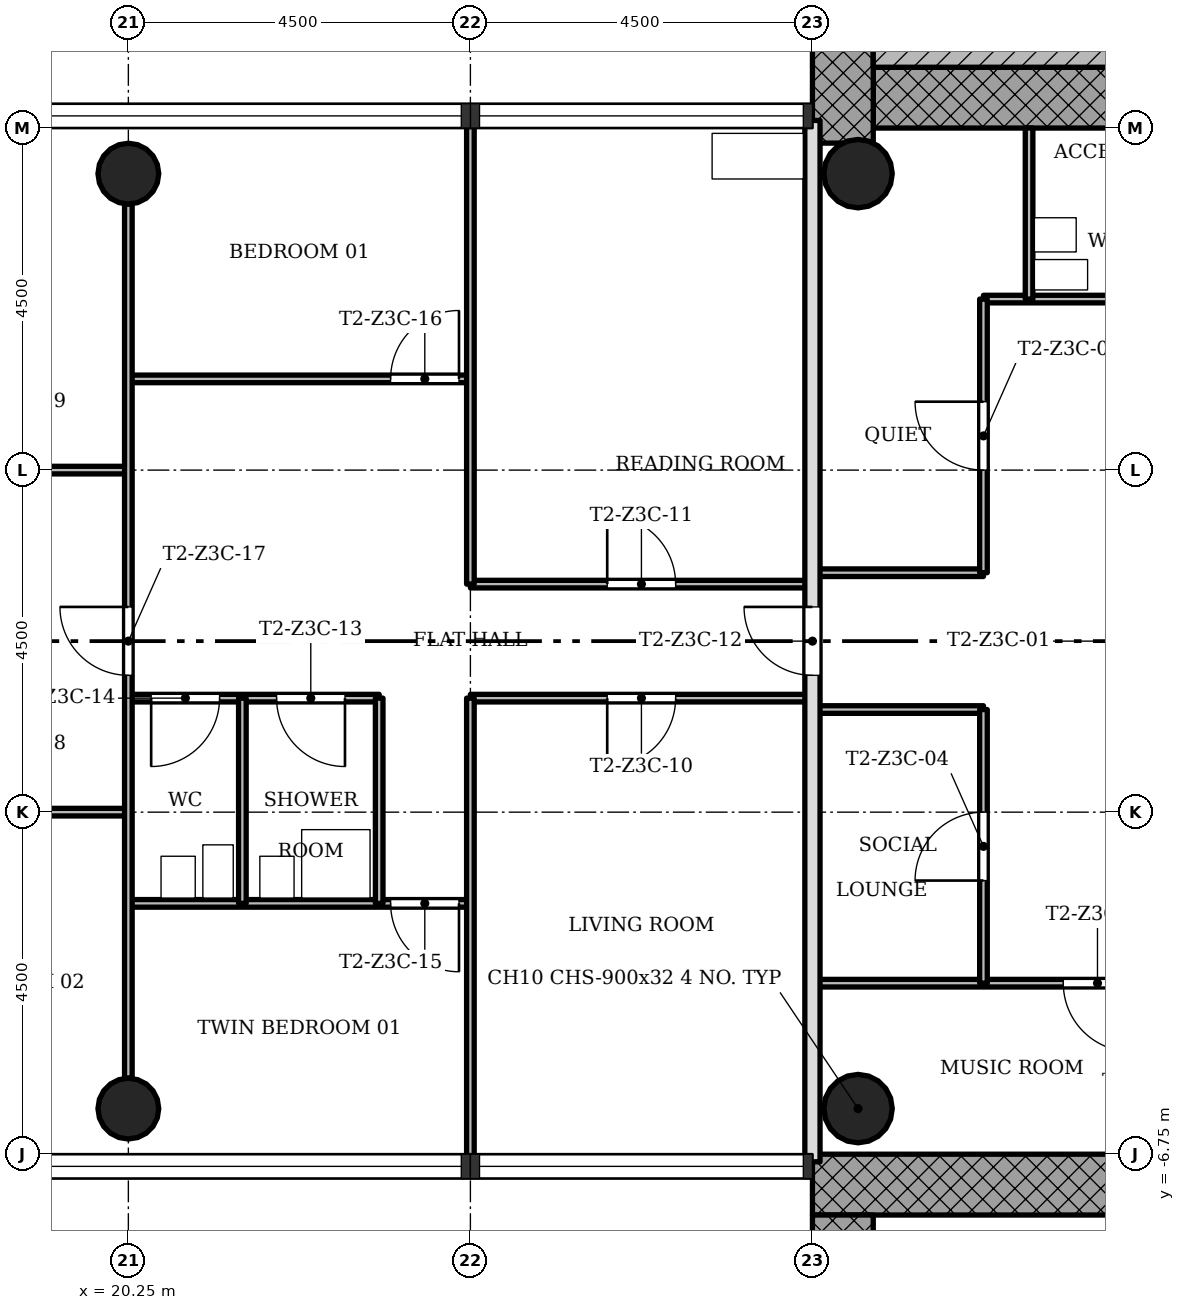
"""IFC4 building model, lengths in metres.
Left out: names, types, materials, properties, quantities, classifications, styles, units other than length and angle.
Written with IfcOpenShell. Run it as: python <this file> out.ifc"""

import sys

from ifc_helpers import new_model, si_unit, direction, frame, frame_2d, origin, origin_2d, place, context, subcontext, project, spatial, rectangle, hollow_circle, extrude, element, fill, save


model = new_model("IFC4")
c1 = context("Model", 3, precision=1e-05, world=origin(), true_north=direction((0.0, 1.0)))
c2 = subcontext(c1, "Body", "Model", "MODEL_VIEW")
j1 = project(units=[si_unit("LENGTHUNIT", "METRE"), si_unit("PLANEANGLEUNIT", "RADIAN")], contexts=[c1])
p1 = place(None, origin())
s1 = spatial("IfcSite", under=j1, at=p1, CompositionType="ELEMENT")
p2 = place(p1, origin())
s2 = spatial("IfcBuilding", under=s1, at=p2, CompositionType="ELEMENT")
p3 = place(p2, frame((0.0, 0.0, 154.1)))
s3 = spatial("IfcBuildingStorey", under=s2, at=p3, CompositionType="ELEMENT", Elevation=154.1)
p4 = place(p3, frame((30.05, 7.15, 0.0), z_axis=(0.0, 0.0, 1.0), x_axis=(1.0, 0.0, 0.0)))
e1 = element("IfcWall", 1, at=p4, inside=s3, PredefinedType="SHEAR", context=c2, shape_type="SweptSolid", body=[
    extrude(rectangle(XDim=12.7, YDim=0.8, at=frame_2d((6.35, 0.0))), origin(), (0.0, 0.0, 1.0), 3.4),
])
p5 = place(p4, frame((5.05, 0.0, 0.0)))
e2 = element("IfcOpeningElement", 2, at=p5, cuts=e1, PredefinedType="OPENING", context=c2, shape_type="SweptSolid", body=[
    extrude(rectangle(XDim=1.8, YDim=2.1, at=frame_2d((0.9, 1.05))), frame((0.0, 0.41, 0.0), z_axis=(0.0, -1.0, 0.0), x_axis=(1.0, 0.0, 0.0)), (0.0, 0.0, 1.0), 0.82),
])
p6 = place(p3, frame((29.65, 15.348, 0.0), z_axis=(0.0, 0.0, 1.0), x_axis=(0.0, -1.0, 0.0)))
e3 = element("IfcWall", 3, at=p6, inside=s3, PredefinedType="SHEAR", context=c2, shape_type="SweptSolid", body=[
    extrude(rectangle(XDim=8.796, YDim=0.8, at=frame_2d((4.398, 0.0))), origin(), (0.0, 0.0, 1.0), 3.4),
])
p7 = place(p3, frame((41.95, -7.15, 0.0), z_axis=(0.0, 0.0, 1.0), x_axis=(-1.0, 0.0, 0.0)))
e4 = element("IfcWall", 4, at=p7, inside=s3, PredefinedType="SHEAR", context=c2, shape_type="SweptSolid", body=[
    extrude(rectangle(XDim=12.7, YDim=0.8, at=frame_2d((6.35, 0.0))), origin(), (0.0, 0.0, 1.0), 3.4),
])
p8 = place(p7, frame((5.05, 0.0, 0.0)))
e5 = element("IfcOpeningElement", 5, at=p8, cuts=e4, PredefinedType="OPENING", context=c2, shape_type="SweptSolid", body=[
    extrude(rectangle(XDim=1.8, YDim=2.1, at=frame_2d((0.9, 1.05))), frame((0.0, 0.41, 0.0), z_axis=(0.0, -1.0, 0.0), x_axis=(1.0, 0.0, 0.0)), (0.0, 0.0, 1.0), 0.82),
])
p9 = place(p3, frame((29.65, -7.55, 0.0), z_axis=(0.0, 0.0, 1.0), x_axis=(0.0, -1.0, 0.0)))
e6 = element("IfcWall", 6, at=p9, inside=s3, PredefinedType="SHEAR", context=c2, shape_type="SweptSolid", body=[
    extrude(rectangle(XDim=8.2, YDim=0.8, at=frame_2d((4.1, 0.0))), origin(), (0.0, 0.0, 1.0), 3.4),
])
for number, where, z_axis, x_axis in (
    (7, (20.25, 6.15, 0.0), (0.0, 0.0, 1.0), (1.0, 0.0, 0.0)),
    (8, (20.25, -6.15, 0.0), (0.0, 0.0, 1.0), (1.0, 0.0, 0.0)),
):
    element("IfcColumn", number, at=place(p3, frame(where, z_axis=z_axis, x_axis=x_axis)), inside=s3, PredefinedType="COLUMN", context=c2, shape_type="SweptSolid", body=[
        extrude(hollow_circle(Radius=0.4, WallThickness=0.028, at=origin_2d()), origin(), (0.0, 0.0, 1.0), 3.4),
    ])
for number, where, z_axis, x_axis in (
    (9, (29.85, 6.15, 0.0), (0.0, 0.0, 1.0), (1.0, 0.0, 0.0)),
    (10, (29.85, -6.15, 0.0), (0.0, 0.0, 1.0), (1.0, 0.0, 0.0)),
):
    element("IfcColumn", number, at=place(p3, frame(where, z_axis=z_axis, x_axis=x_axis)), inside=s3, PredefinedType="COLUMN", context=c2, shape_type="SweptSolid", body=[
        extrude(hollow_circle(Radius=0.45, WallThickness=0.032, at=origin_2d()), origin(), (0.0, 0.0, 1.0), 3.4),
    ])
p10 = place(p3, frame((34.5, -4.5, 0.0), z_axis=(0.0, 0.0, 1.0), x_axis=(-1.0, 0.0, 0.0)))
e11 = element("IfcWall", 11, at=p10, inside=s3, PredefinedType="PARTITIONING", context=c2, shape_type="SweptSolid", body=[
    extrude(rectangle(XDim=5.25, YDim=0.1, at=frame_2d((2.625, 0.0))), origin(), (0.0, 0.0, 1.0), 3.0),
])
p11 = place(p10, frame((1.05, 0.0, 0.0)))
e12 = element("IfcOpeningElement", 12, at=p11, cuts=e11, PredefinedType="OPENING", context=c2, shape_type="SweptSolid", body=[
    extrude(rectangle(XDim=0.9, YDim=2.1, at=frame_2d((0.45, 1.05))), frame((0.0, 0.06, 0.0), z_axis=(0.0, -1.0, 0.0), x_axis=(1.0, 0.0, 0.0)), (0.0, 0.0, 1.0), 0.12),
])
p12 = place(p3, frame((24.75, -3.45, 0.0), z_axis=(0.0, 0.0, 1.0), x_axis=(-1.0, 0.0, 0.0)))
e13 = element("IfcWall", 13, at=p12, inside=s3, PredefinedType="PARTITIONING", context=c2, shape_type="SweptSolid", body=[
    extrude(rectangle(XDim=4.5, YDim=0.1, at=frame_2d((2.25, 0.0))), origin(), (0.0, 0.0, 1.0), 3.0),
])
p13 = place(p12, frame((0.15, 0.0, 0.0)))
e14 = element("IfcOpeningElement", 14, at=p13, cuts=e13, PredefinedType="OPENING", context=c2, shape_type="SweptSolid", body=[
    extrude(rectangle(XDim=0.9, YDim=2.1, at=frame_2d((0.45, 1.05))), frame((0.0, 0.06, 0.0), z_axis=(0.0, -1.0, 0.0), x_axis=(1.0, 0.0, 0.0)), (0.0, 0.0, 1.0), 0.12),
])
p14 = place(p3, frame((20.25, -2.25, 0.0), z_axis=(0.0, 0.0, 1.0), x_axis=(-1.0, 0.0, 0.0)))
e15 = element("IfcWall", 15, at=p14, inside=s3, PredefinedType="PARTITIONING", context=c2, shape_type="SweptSolid", body=[
    extrude(rectangle(XDim=4.6, YDim=0.1, at=frame_2d((2.3, 0.0))), origin(), (0.0, 0.0, 1.0), 3.0),
])
p15 = place(p14, frame((1.05, 0.0, 0.0)))
e16 = element("IfcOpeningElement", 16, at=p15, cuts=e15, PredefinedType="OPENING", context=c2, shape_type="SweptSolid", body=[
    extrude(rectangle(XDim=0.9, YDim=2.1, at=frame_2d((0.45, 1.05))), frame((0.0, 0.06, 0.0), z_axis=(0.0, -1.0, 0.0), x_axis=(1.0, 0.0, 0.0)), (0.0, 0.0, 1.0), 0.12),
])
p16 = place(p3, frame((31.5, -0.9, 0.0), z_axis=(0.0, 0.0, 1.0), x_axis=(-1.0, 0.0, 0.0)))
e17 = element("IfcWall", 17, at=p16, inside=s3, PredefinedType="PARTITIONING", context=c2, shape_type="SweptSolid", body=[
    extrude(rectangle(XDim=2.25, YDim=0.1, at=frame_2d((1.125, 0.0))), origin(), (0.0, 0.0, 1.0), 3.0),
])
p17 = place(p3, frame((29.25, -0.75, 0.0), z_axis=(0.0, 0.0, 1.0), x_axis=(-1.0, 0.0, 0.0)))
e18 = element("IfcWall", 18, at=p17, inside=s3, PredefinedType="PARTITIONING", context=c2, shape_type="SweptSolid", body=[
    extrude(rectangle(XDim=4.5, YDim=0.1, at=frame_2d((2.25, 0.0))), origin(), (0.0, 0.0, 1.0), 3.0),
])
p18 = place(p17, frame((1.8, 0.0, 0.0)))
e19 = element("IfcOpeningElement", 19, at=p18, cuts=e18, PredefinedType="OPENING", context=c2, shape_type="SweptSolid", body=[
    extrude(rectangle(XDim=0.9, YDim=2.1, at=frame_2d((0.45, 1.05))), frame((0.0, 0.06, 0.0), z_axis=(0.0, -1.0, 0.0), x_axis=(1.0, 0.0, 0.0)), (0.0, 0.0, 1.0), 0.12),
])
p19 = place(p3, frame((23.55, -0.75, 0.0), z_axis=(0.0, 0.0, 1.0), x_axis=(-1.0, 0.0, 0.0)))
e20 = element("IfcWall", 20, at=p19, inside=s3, PredefinedType="PARTITIONING", context=c2, shape_type="SweptSolid", body=[
    extrude(rectangle(XDim=3.3, YDim=0.1, at=frame_2d((1.65, 0.0))), origin(), (0.0, 0.0, 1.0), 3.0),
])
p20 = place(p19, frame((0.45, 0.0, 0.0)))
e21 = element("IfcOpeningElement", 21, at=p20, cuts=e20, PredefinedType="OPENING", context=c2, shape_type="SweptSolid", body=[
    extrude(rectangle(XDim=0.9, YDim=2.1, at=frame_2d((0.45, 1.05))), frame((0.0, 0.06, 0.0), z_axis=(0.0, -1.0, 0.0), x_axis=(1.0, 0.0, 0.0)), (0.0, 0.0, 1.0), 0.12),
])
p21 = place(p19, frame((2.1, 0.0, 0.0)))
e22 = element("IfcOpeningElement", 22, at=p21, cuts=e20, PredefinedType="OPENING", context=c2, shape_type="SweptSolid", body=[
    extrude(rectangle(XDim=0.9, YDim=2.1, at=frame_2d((0.45, 1.05))), frame((0.0, 0.06, 0.0), z_axis=(0.0, -1.0, 0.0), x_axis=(1.0, 0.0, 0.0)), (0.0, 0.0, 1.0), 0.12),
])
p22 = place(p3, frame((29.25, 0.75, 0.0), z_axis=(0.0, 0.0, 1.0), x_axis=(-1.0, 0.0, 0.0)))
e23 = element("IfcWall", 23, at=p22, inside=s3, PredefinedType="PARTITIONING", context=c2, shape_type="SweptSolid", body=[
    extrude(rectangle(XDim=4.5, YDim=0.1, at=frame_2d((2.25, 0.0))), origin(), (0.0, 0.0, 1.0), 3.0),
])
p23 = place(p22, frame((1.8, 0.0, 0.0)))
e24 = element("IfcOpeningElement", 24, at=p23, cuts=e23, PredefinedType="OPENING", context=c2, shape_type="SweptSolid", body=[
    extrude(rectangle(XDim=0.9, YDim=2.1, at=frame_2d((0.45, 1.05))), frame((0.0, 0.06, 0.0), z_axis=(0.0, -1.0, 0.0), x_axis=(1.0, 0.0, 0.0)), (0.0, 0.0, 1.0), 0.12),
])
p24 = place(p3, frame((31.5, 0.9, 0.0), z_axis=(0.0, 0.0, 1.0), x_axis=(-1.0, 0.0, 0.0)))
e25 = element("IfcWall", 25, at=p24, inside=s3, PredefinedType="PARTITIONING", context=c2, shape_type="SweptSolid", body=[
    extrude(rectangle(XDim=2.25, YDim=0.1, at=frame_2d((1.125, 0.0))), origin(), (0.0, 0.0, 1.0), 3.0),
])
p25 = place(p3, frame((20.25, 2.25, 0.0), z_axis=(0.0, 0.0, 1.0), x_axis=(-1.0, 0.0, 0.0)))
e26 = element("IfcWall", 26, at=p25, inside=s3, PredefinedType="PARTITIONING", context=c2, shape_type="SweptSolid", body=[
    extrude(rectangle(XDim=4.6, YDim=0.1, at=frame_2d((2.3, 0.0))), origin(), (0.0, 0.0, 1.0), 3.0),
])
p26 = place(p25, frame((1.05, 0.0, 0.0)))
e27 = element("IfcOpeningElement", 27, at=p26, cuts=e26, PredefinedType="OPENING", context=c2, shape_type="SweptSolid", body=[
    extrude(rectangle(XDim=0.9, YDim=2.1, at=frame_2d((0.45, 1.05))), frame((0.0, 0.06, 0.0), z_axis=(0.0, -1.0, 0.0), x_axis=(1.0, 0.0, 0.0)), (0.0, 0.0, 1.0), 0.12),
])
p27 = place(p3, frame((24.75, 3.45, 0.0), z_axis=(0.0, 0.0, 1.0), x_axis=(-1.0, 0.0, 0.0)))
e28 = element("IfcWall", 28, at=p27, inside=s3, PredefinedType="PARTITIONING", context=c2, shape_type="SweptSolid", body=[
    extrude(rectangle(XDim=4.5, YDim=0.1, at=frame_2d((2.25, 0.0))), origin(), (0.0, 0.0, 1.0), 3.0),
])
p28 = place(p27, frame((0.15, 0.0, 0.0)))
e29 = element("IfcOpeningElement", 29, at=p28, cuts=e28, PredefinedType="OPENING", context=c2, shape_type="SweptSolid", body=[
    extrude(rectangle(XDim=0.9, YDim=2.1, at=frame_2d((0.45, 1.05))), frame((0.0, 0.06, 0.0), z_axis=(0.0, -1.0, 0.0), x_axis=(1.0, 0.0, 0.0)), (0.0, 0.0, 1.0), 0.12),
])
p29 = place(p3, frame((34.5, 4.5, 0.0), z_axis=(0.0, 0.0, 1.0), x_axis=(-1.0, 0.0, 0.0)))
e30 = element("IfcWall", 30, at=p29, inside=s3, PredefinedType="PARTITIONING", context=c2, shape_type="SweptSolid", body=[
    extrude(rectangle(XDim=3.0, YDim=0.1, at=frame_2d((1.5, 0.0))), origin(), (0.0, 0.0, 1.0), 3.0),
])
p30 = place(p3, frame((32.1, 4.5, 0.0), z_axis=(0.0, 0.0, 1.0), x_axis=(0.0, 1.0, 0.0)))
e31 = element("IfcWall", 31, at=p30, inside=s3, PredefinedType="PARTITIONING", context=c2, shape_type="SweptSolid", body=[
    extrude(rectangle(XDim=2.25, YDim=0.1, at=frame_2d((1.125, 0.0))), origin(), (0.0, 0.0, 1.0), 3.0),
])
p31 = place(p3, frame((31.5, -4.5, 0.0), z_axis=(0.0, 0.0, 1.0), x_axis=(0.0, 1.0, 0.0)))
e32 = element("IfcWall", 32, at=p31, inside=s3, PredefinedType="PARTITIONING", context=c2, shape_type="SweptSolid", body=[
    extrude(rectangle(XDim=3.6, YDim=0.1, at=frame_2d((1.8, 0.0))), origin(), (0.0, 0.0, 1.0), 3.0),
])
p32 = place(p31, frame((1.35, 0.0, 0.0)))
e33 = element("IfcOpeningElement", 33, at=p32, cuts=e32, PredefinedType="OPENING", context=c2, shape_type="SweptSolid", body=[
    extrude(rectangle(XDim=0.9, YDim=2.1, at=frame_2d((0.45, 1.05))), frame((0.0, 0.06, 0.0), z_axis=(0.0, -1.0, 0.0), x_axis=(1.0, 0.0, 0.0)), (0.0, 0.0, 1.0), 0.12),
])
p33 = place(p3, frame((31.5, 0.9, 0.0), z_axis=(0.0, 0.0, 1.0), x_axis=(0.0, 1.0, 0.0)))
e34 = element("IfcWall", 34, at=p33, inside=s3, PredefinedType="PARTITIONING", context=c2, shape_type="SweptSolid", body=[
    extrude(rectangle(XDim=3.6, YDim=0.1, at=frame_2d((1.8, 0.0))), origin(), (0.0, 0.0, 1.0), 3.0),
])
p34 = place(p33, frame((1.35, 0.0, 0.0)))
e35 = element("IfcOpeningElement", 35, at=p34, cuts=e34, PredefinedType="OPENING", context=c2, shape_type="SweptSolid", body=[
    extrude(rectangle(XDim=0.9, YDim=2.1, at=frame_2d((0.45, 1.05))), frame((0.0, 0.06, 0.0), z_axis=(0.0, -1.0, 0.0), x_axis=(1.0, 0.0, 0.0)), (0.0, 0.0, 1.0), 0.12),
])
p35 = place(p3, frame((29.25, -6.85, 0.0), z_axis=(0.0, 0.0, 1.0), x_axis=(0.0, 1.0, 0.0)))
e36 = element("IfcWall", 36, at=p35, inside=s3, PredefinedType="SOLIDWALL", context=c2, shape_type="SweptSolid", body=[
    extrude(rectangle(XDim=13.7, YDim=0.2, at=frame_2d((6.85, 0.0))), origin(), (0.0, 0.0, 1.0), 3.0),
])
p36 = place(p35, frame((6.4, 0.0, 0.0)))
e37 = element("IfcOpeningElement", 37, at=p36, cuts=e36, PredefinedType="OPENING", context=c2, shape_type="SweptSolid", body=[
    extrude(rectangle(XDim=0.9, YDim=2.1, at=frame_2d((0.45, 1.05))), frame((0.0, 0.11, 0.0), z_axis=(0.0, -1.0, 0.0), x_axis=(1.0, 0.0, 0.0)), (0.0, 0.0, 1.0), 0.22),
])
for number, where, z_axis, x_axis in (
    (38, (24.75, -6.85, 0.0), (0.0, 0.0, 1.0), (0.0, 1.0, 0.0)),
    (39, (24.75, 0.75, 0.0), (0.0, 0.0, 1.0), (0.0, 1.0, 0.0)),
):
    element("IfcWall", number, at=place(p3, frame(where, z_axis=z_axis, x_axis=x_axis)), inside=s3, PredefinedType="PARTITIONING", context=c2, shape_type="SweptSolid", body=[
        extrude(rectangle(XDim=6.1, YDim=0.1, at=frame_2d((3.05, 0.0))), origin(), (0.0, 0.0, 1.0), 3.0),
    ])
for number, where, z_axis, x_axis in (
    (40, (23.55, -3.45, 0.0), (0.0, 0.0, 1.0), (0.0, 1.0, 0.0)),
    (41, (21.75, -3.45, 0.0), (0.0, 0.0, 1.0), (0.0, 1.0, 0.0)),
):
    element("IfcWall", number, at=place(p3, frame(where, z_axis=z_axis, x_axis=x_axis)), inside=s3, PredefinedType="PARTITIONING", context=c2, shape_type="SweptSolid", body=[
        extrude(rectangle(XDim=2.7, YDim=0.1, at=frame_2d((1.35, 0.0))), origin(), (0.0, 0.0, 1.0), 3.0),
    ])
p37 = place(p3, frame((20.25, -5.75, 0.0), z_axis=(0.0, 0.0, 1.0), x_axis=(0.0, 1.0, 0.0)))
e42 = element("IfcWall", 42, at=p37, inside=s3, PredefinedType="PARTITIONING", context=c2, shape_type="SweptSolid", body=[
    extrude(rectangle(XDim=11.5, YDim=0.1, at=frame_2d((5.75, 0.0))), origin(), (0.0, 0.0, 1.0), 3.0),
])
p38 = place(p37, frame((5.3, 0.0, 0.0)))
e43 = element("IfcOpeningElement", 43, at=p38, cuts=e42, PredefinedType="OPENING", context=c2, shape_type="SweptSolid", body=[
    extrude(rectangle(XDim=0.9, YDim=2.1, at=frame_2d((0.45, 1.05))), frame((0.0, 0.06, 0.0), z_axis=(0.0, -1.0, 0.0), x_axis=(1.0, 0.0, 0.0)), (0.0, 0.0, 1.0), 0.12),
])
p39 = place(p3, frame((34.15, 7.75, 0.0), z_axis=(0.0, 0.0, 1.0), x_axis=(-1.0, 0.0, 0.0)))
e44 = element("IfcWall", 44, at=p39, inside=s3, PredefinedType="SHEAR", context=c2, shape_type="SweptSolid", body=[
    extrude(rectangle(XDim=4.1, YDim=0.4, at=frame_2d((2.05, 0.0))), origin(), (0.0, 0.0, 1.0), 3.4),
])
p40 = place(p34, origin())
e45 = element("IfcDoor", 45, at=p40, inside=s3, OperationType="SINGLE_SWING_LEFT", PredefinedType="DOOR", context=c2, shape_type="SweptSolid", body=[
    extrude(rectangle(XDim=0.9, YDim=2.1, at=frame_2d((0.45, 1.05))), frame((0.0, 0.025, 0.0), z_axis=(0.0, -1.0, 0.0), x_axis=(1.0, 0.0, 0.0)), (0.0, 0.0, 1.0), 0.05),
])
fill(e35, e45)
p41 = place(p32, origin())
e46 = element("IfcDoor", 46, at=p41, inside=s3, OperationType="SINGLE_SWING_RIGHT", PredefinedType="DOOR", context=c2, shape_type="SweptSolid", body=[
    extrude(rectangle(XDim=0.9, YDim=2.1, at=frame_2d((0.45, 1.05))), frame((0.0, 0.025, 0.0), z_axis=(0.0, -1.0, 0.0), x_axis=(1.0, 0.0, 0.0)), (0.0, 0.0, 1.0), 0.05),
])
fill(e33, e46)
p42 = place(p11, origin())
e47 = element("IfcDoor", 47, at=p42, inside=s3, OperationType="SINGLE_SWING_RIGHT", PredefinedType="DOOR", context=c2, shape_type="SweptSolid", body=[
    extrude(rectangle(XDim=0.9, YDim=2.1, at=frame_2d((0.45, 1.05))), frame((0.0, 0.025, 0.0), z_axis=(0.0, -1.0, 0.0), x_axis=(1.0, 0.0, 0.0)), (0.0, 0.0, 1.0), 0.05),
])
fill(e12, e47)
p43 = place(p18, origin())
e48 = element("IfcDoor", 48, at=p43, inside=s3, OperationType="SINGLE_SWING_LEFT", PredefinedType="DOOR", context=c2, shape_type="SweptSolid", body=[
    extrude(rectangle(XDim=0.9, YDim=2.1, at=frame_2d((0.45, 1.05))), frame((0.0, 0.025, 0.0), z_axis=(0.0, -1.0, 0.0), x_axis=(1.0, 0.0, 0.0)), (0.0, 0.0, 1.0), 0.05),
])
fill(e19, e48)
p44 = place(p23, origin())
e49 = element("IfcDoor", 49, at=p44, inside=s3, OperationType="SINGLE_SWING_RIGHT", PredefinedType="DOOR", context=c2, shape_type="SweptSolid", body=[
    extrude(rectangle(XDim=0.9, YDim=2.1, at=frame_2d((0.45, 1.05))), frame((0.0, 0.025, 0.0), z_axis=(0.0, -1.0, 0.0), x_axis=(1.0, 0.0, 0.0)), (0.0, 0.0, 1.0), 0.05),
])
fill(e24, e49)
p45 = place(p36, origin())
e50 = element("IfcDoor", 50, at=p45, inside=s3, OperationType="SINGLE_SWING_LEFT", PredefinedType="DOOR", context=c2, shape_type="SweptSolid", body=[
    extrude(rectangle(XDim=0.9, YDim=2.1, at=frame_2d((0.45, 1.05))), frame((0.0, 0.025, 0.0), z_axis=(0.0, -1.0, 0.0), x_axis=(1.0, 0.0, 0.0)), (0.0, 0.0, 1.0), 0.05),
])
fill(e37, e50)
p46 = place(p20, origin())
e51 = element("IfcDoor", 51, at=p46, inside=s3, OperationType="SINGLE_SWING_RIGHT", PredefinedType="DOOR", context=c2, shape_type="SweptSolid", body=[
    extrude(rectangle(XDim=0.9, YDim=2.1, at=frame_2d((0.45, 1.05))), frame((0.0, 0.025, 0.0), z_axis=(0.0, -1.0, 0.0), x_axis=(1.0, 0.0, 0.0)), (0.0, 0.0, 1.0), 0.05),
])
fill(e21, e51)
p47 = place(p21, origin())
e52 = element("IfcDoor", 52, at=p47, inside=s3, OperationType="SINGLE_SWING_LEFT", PredefinedType="DOOR", context=c2, shape_type="SweptSolid", body=[
    extrude(rectangle(XDim=0.9, YDim=2.1, at=frame_2d((0.45, 1.05))), frame((0.0, 0.025, 0.0), z_axis=(0.0, -1.0, 0.0), x_axis=(1.0, 0.0, 0.0)), (0.0, 0.0, 1.0), 0.05),
])
fill(e22, e52)
p48 = place(p13, origin())
e53 = element("IfcDoor", 53, at=p48, inside=s3, OperationType="SINGLE_SWING_RIGHT", PredefinedType="DOOR", context=c2, shape_type="SweptSolid", body=[
    extrude(rectangle(XDim=0.9, YDim=2.1, at=frame_2d((0.45, 1.05))), frame((0.0, 0.025, 0.0), z_axis=(0.0, -1.0, 0.0), x_axis=(1.0, 0.0, 0.0)), (0.0, 0.0, 1.0), 0.05),
])
fill(e14, e53)
p49 = place(p28, origin())
e54 = element("IfcDoor", 54, at=p49, inside=s3, OperationType="SINGLE_SWING_LEFT", PredefinedType="DOOR", context=c2, shape_type="SweptSolid", body=[
    extrude(rectangle(XDim=0.9, YDim=2.1, at=frame_2d((0.45, 1.05))), frame((0.0, 0.025, 0.0), z_axis=(0.0, -1.0, 0.0), x_axis=(1.0, 0.0, 0.0)), (0.0, 0.0, 1.0), 0.05),
])
fill(e29, e54)
p50 = place(p38, origin())
e55 = element("IfcDoor", 55, at=p50, inside=s3, OperationType="SINGLE_SWING_LEFT", PredefinedType="DOOR", context=c2, shape_type="SweptSolid", body=[
    extrude(rectangle(XDim=0.9, YDim=2.1, at=frame_2d((0.45, 1.05))), frame((0.0, 0.025, 0.0), z_axis=(0.0, -1.0, 0.0), x_axis=(1.0, 0.0, 0.0)), (0.0, 0.0, 1.0), 0.05),
])
fill(e43, e55)
save(model, sys.argv[1])
